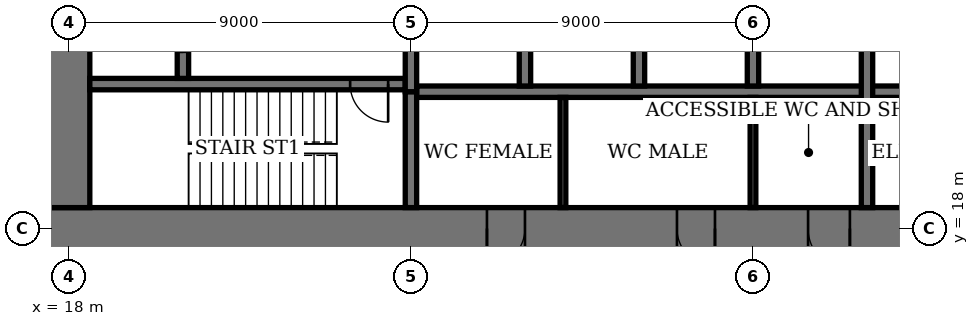
"""IFC4 building model, lengths in metres.
Left out: names, types, materials, properties, quantities, classifications, styles, units other than length and angle.
Written with IfcOpenShell. Run it as: python <this file> out.ifc"""

import sys

from ifc_helpers import new_model, si_unit, direction, frame, frame_2d, origin, place, context, subcontext, project, spatial, rectangle, extrude, element, fill, save


model = new_model("IFC4")
c1 = context("Model", 3, precision=1e-05, world=origin(), true_north=direction((0.0, 1.0)))
c2 = subcontext(c1, "Body", "Model", "MODEL_VIEW")
j1 = project(units=[si_unit("LENGTHUNIT", "METRE"), si_unit("PLANEANGLEUNIT", "RADIAN")], contexts=[c1])
p1 = place(None, origin())
s1 = spatial("IfcSite", under=j1, at=p1, CompositionType="ELEMENT")
p2 = place(p1, origin())
s2 = spatial("IfcBuilding", under=s1, at=p2, CompositionType="ELEMENT")
p3 = place(p2, frame((0.0, 0.0, 263.4)))
s3 = spatial("IfcBuildingStorey", under=s2, at=p3, CompositionType="ELEMENT", Elevation=263.4)
p4 = place(p3, frame((17.45, 18.0, 0.0), z_axis=(0.0, 0.0, 1.0), x_axis=(1.0, 0.0, 0.0)))
e1 = element("IfcWall", 1, at=p4, inside=s3, PredefinedType="SHEAR", context=c2, shape_type="SweptSolid", body=[
    extrude(rectangle(XDim=28.1, YDim=1.1, at=frame_2d((14.05, 0.0))), origin(), (0.0, 0.0, 1.0), 4.0),
])
p5 = place(p4, frame((11.55, 0.0, 0.0)))
e2 = element("IfcOpeningElement", 2, at=p5, cuts=e1, PredefinedType="OPENING", context=c2, shape_type="SweptSolid", body=[
    extrude(rectangle(XDim=1.0, YDim=2.4, at=frame_2d((0.5, 1.2))), frame((0.0, 0.56, 0.0), z_axis=(0.0, -1.0, 0.0), x_axis=(1.0, 0.0, 0.0)), (0.0, 0.0, 1.0), 1.12),
])
p6 = place(p4, frame((16.55, 0.0, 0.0)))
e3 = element("IfcOpeningElement", 3, at=p6, cuts=e1, PredefinedType="OPENING", context=c2, shape_type="SweptSolid", body=[
    extrude(rectangle(XDim=1.0, YDim=2.4, at=frame_2d((0.5, 1.2))), frame((0.0, 0.56, 0.0), z_axis=(0.0, -1.0, 0.0), x_axis=(1.0, 0.0, 0.0)), (0.0, 0.0, 1.0), 1.12),
])
p7 = place(p4, frame((20.0, 0.0, 0.0)))
e4 = element("IfcOpeningElement", 4, at=p7, cuts=e1, PredefinedType="OPENING", context=c2, shape_type="SweptSolid", body=[
    extrude(rectangle(XDim=1.1, YDim=2.4, at=frame_2d((0.55, 1.2))), frame((0.0, 0.56, 0.0), z_axis=(0.0, -1.0, 0.0), x_axis=(1.0, 0.0, 0.0)), (0.0, 0.0, 1.0), 1.12),
])
p8 = place(p4, frame((24.05, 0.0, 0.0)))
e5 = element("IfcOpeningElement", 5, at=p8, cuts=e1, PredefinedType="OPENING", context=c2, shape_type="SweptSolid", body=[
    extrude(rectangle(XDim=1.0, YDim=2.4, at=frame_2d((0.5, 1.2))), frame((0.0, 0.56, 0.0), z_axis=(0.0, -1.0, 0.0), x_axis=(1.0, 0.0, 0.0)), (0.0, 0.0, 1.0), 1.12),
])
p9 = place(p3, frame((18.0, 35.45, 0.0), z_axis=(0.0, 0.0, 1.0), x_axis=(0.0, -1.0, 0.0)))
e6 = element("IfcWall", 6, at=p9, inside=s3, PredefinedType="SHEAR", context=c2, shape_type="SweptSolid", body=[
    extrude(rectangle(XDim=16.9, YDim=1.1, at=frame_2d((8.45, 0.0))), origin(), (0.0, 0.0, 1.0), 4.0),
])
p10 = place(p9, frame((8.45, 0.0, 0.0)))
e7 = element("IfcOpeningElement", 7, at=p10, cuts=e6, PredefinedType="OPENING", context=c2, shape_type="SweptSolid", body=[
    extrude(rectangle(XDim=1.8, YDim=2.4, at=frame_2d((0.9, 1.2))), frame((0.0, 0.56, 0.0), z_axis=(0.0, -1.0, 0.0), x_axis=(1.0, 0.0, 0.0)), (0.0, 0.0, 1.0), 1.12),
])
p11 = place(p3, frame((18.55, 21.8, 0.0), z_axis=(0.0, 0.0, 1.0), x_axis=(1.0, 0.0, 0.0)))
e8 = element("IfcWall", 8, at=p11, inside=s3, PredefinedType="SHEAR", context=c2, shape_type="SweptSolid", body=[
    extrude(rectangle(XDim=8.3, YDim=0.3, at=frame_2d((4.15, 0.0))), origin(), (0.0, 0.0, 1.0), 4.0),
])
p12 = place(p11, frame((6.85, 0.0, 0.0)))
e9 = element("IfcOpeningElement", 9, at=p12, cuts=e8, PredefinedType="OPENING", context=c2, shape_type="SweptSolid", body=[
    extrude(rectangle(XDim=1.0, YDim=2.4, at=frame_2d((0.5, 1.2))), frame((0.0, 0.16, 0.0), z_axis=(0.0, -1.0, 0.0), x_axis=(1.0, 0.0, 0.0)), (0.0, 0.0, 1.0), 0.32),
])
p13 = place(p3, frame((27.0, 18.55, 0.0), z_axis=(0.0, 0.0, 1.0), x_axis=(0.0, 1.0, 0.0)))
e10 = element("IfcWall", 10, at=p13, inside=s3, PredefinedType="SHEAR", context=c2, shape_type="SweptSolid", body=[
    extrude(rectangle(XDim=3.05, YDim=0.3, at=frame_2d((1.525, 0.0))), origin(), (0.0, 0.0, 1.0), 4.0),
])
p14 = place(p3, frame((21.0, 21.95, 0.0), z_axis=(0.0, 0.0, 1.0), x_axis=(0.0, 1.0, 0.0)))
e11 = element("IfcWall", 11, at=p14, inside=s3, PredefinedType="SHEAR", context=c2, shape_type="SweptSolid", body=[
    extrude(rectangle(XDim=2.5, YDim=0.3, at=frame_2d((1.25, 0.0))), origin(), (0.0, 0.0, 1.0), 4.0),
])
p15 = place(p14, frame((0.7, 0.0, 0.0)))
e12 = element("IfcOpeningElement", 12, at=p15, cuts=e11, PredefinedType="OPENING", context=c2, shape_type="SweptSolid", body=[
    extrude(rectangle(XDim=1.1, YDim=2.4, at=frame_2d((0.55, 1.2))), frame((0.0, 0.16, 0.0), z_axis=(0.0, -1.0, 0.0), x_axis=(1.0, 0.0, 0.0)), (0.0, 0.0, 1.0), 0.32),
])
p16 = place(p3, frame((27.15, 21.6, 0.0), z_axis=(0.0, 0.0, 1.0), x_axis=(1.0, 0.0, 0.0)))
e13 = element("IfcWall", 13, at=p16, inside=s3, PredefinedType="SHEAR", context=c2, shape_type="SweptSolid", body=[
    extrude(rectangle(XDim=17.3, YDim=0.3, at=frame_2d((8.65, 0.0))), origin(), (0.0, 0.0, 1.0), 4.0),
])
for number, where, z_axis, x_axis in (
    (14, (30.0, 21.75, 0.0), (0.0, 0.0, 1.0), (0.0, 1.0, 0.0)),
    (15, (33.0, 21.75, 0.0), (0.0, 0.0, 1.0), (0.0, 1.0, 0.0)),
    (16, (36.0, 21.75, 0.0), (0.0, 0.0, 1.0), (0.0, 1.0, 0.0)),
):
    element("IfcWall", number, at=place(p3, frame(where, z_axis=z_axis, x_axis=x_axis)), inside=s3, PredefinedType="SHEAR", context=c2, shape_type="SweptSolid", body=[
        extrude(rectangle(XDim=2.7, YDim=0.3, at=frame_2d((1.35, 0.0))), origin(), (0.0, 0.0, 1.0), 4.0),
    ])
p17 = place(p3, frame((39.0, 18.55, 0.0), z_axis=(0.0, 0.0, 1.0), x_axis=(0.0, 1.0, 0.0)))
e17 = element("IfcWall", 17, at=p17, inside=s3, PredefinedType="SHEAR", context=c2, shape_type="SweptSolid", body=[
    extrude(rectangle(XDim=5.9, YDim=0.3, at=frame_2d((2.95, 0.0))), origin(), (0.0, 0.0, 1.0), 4.0),
])
p18 = place(p3, frame((27.0, 21.6, 0.0), z_axis=(0.0, 0.0, 1.0), x_axis=(0.0, 1.0, 0.0)))
e18 = element("IfcWall", 18, at=p18, inside=s3, PredefinedType="SHEAR", context=c2, shape_type="SweptSolid", body=[
    extrude(rectangle(XDim=2.85, YDim=0.3, at=frame_2d((1.425, 0.0))), origin(), (0.0, 0.0, 1.0), 4.0),
])
for number, where, z_axis, x_axis in (
    (19, (31.0, 18.55, 0.0), (0.0, 0.0, 1.0), (0.0, 1.0, 0.0)),
    (20, (36.0, 18.55, 0.0), (0.0, 0.0, 1.0), (0.0, 1.0, 0.0)),
):
    element("IfcWall", number, at=place(p3, frame(where, z_axis=z_axis, x_axis=x_axis)), inside=s3, PredefinedType="PARTITIONING", context=c2, shape_type="SweptSolid", body=[
        extrude(rectangle(XDim=2.9, YDim=0.15, at=frame_2d((1.45, 0.0))), origin(), (0.0, 0.0, 1.0), 3.75),
    ])
p19 = place(p5, origin())
e21 = element("IfcDoor", 21, at=p19, inside=s3, OperationType="SINGLE_SWING_LEFT", PredefinedType="DOOR", context=c2, shape_type="SweptSolid", body=[
    extrude(rectangle(XDim=1.0, YDim=2.4, at=frame_2d((0.5, 1.2))), frame((0.0, 0.025, 0.0), z_axis=(0.0, -1.0, 0.0), x_axis=(1.0, 0.0, 0.0)), (0.0, 0.0, 1.0), 0.05),
    extrude(rectangle(XDim=0.04, YDim=2.4, at=frame_2d((0.02, 1.2))), frame((0.0, 0.4, 0.0), z_axis=(0.0, -1.0, 0.0), x_axis=(1.0, 0.0, 0.0)), (0.0, 0.0, 1.0), 0.8),
    extrude(rectangle(XDim=0.04, YDim=2.4, at=frame_2d((0.98, 1.2))), frame((0.0, 0.4, 0.0), z_axis=(0.0, -1.0, 0.0), x_axis=(1.0, 0.0, 0.0)), (0.0, 0.0, 1.0), 0.8),
    extrude(rectangle(XDim=1.0, YDim=0.04, at=frame_2d((0.5, 2.38))), frame((0.0, 0.4, 0.0), z_axis=(0.0, -1.0, 0.0), x_axis=(1.0, 0.0, 0.0)), (0.0, 0.0, 1.0), 0.8),
])
fill(e2, e21)
p20 = place(p6, origin())
e22 = element("IfcDoor", 22, at=p20, inside=s3, OperationType="SINGLE_SWING_RIGHT", PredefinedType="DOOR", context=c2, shape_type="SweptSolid", body=[
    extrude(rectangle(XDim=1.0, YDim=2.4, at=frame_2d((0.5, 1.2))), frame((0.0, 0.025, 0.0), z_axis=(0.0, -1.0, 0.0), x_axis=(1.0, 0.0, 0.0)), (0.0, 0.0, 1.0), 0.05),
    extrude(rectangle(XDim=0.04, YDim=2.4, at=frame_2d((0.02, 1.2))), frame((0.0, 0.4, 0.0), z_axis=(0.0, -1.0, 0.0), x_axis=(1.0, 0.0, 0.0)), (0.0, 0.0, 1.0), 0.8),
    extrude(rectangle(XDim=0.04, YDim=2.4, at=frame_2d((0.98, 1.2))), frame((0.0, 0.4, 0.0), z_axis=(0.0, -1.0, 0.0), x_axis=(1.0, 0.0, 0.0)), (0.0, 0.0, 1.0), 0.8),
    extrude(rectangle(XDim=1.0, YDim=0.04, at=frame_2d((0.5, 2.38))), frame((0.0, 0.4, 0.0), z_axis=(0.0, -1.0, 0.0), x_axis=(1.0, 0.0, 0.0)), (0.0, 0.0, 1.0), 0.8),
])
fill(e3, e22)
p21 = place(p7, origin())
e23 = element("IfcDoor", 23, at=p21, inside=s3, OperationType="SINGLE_SWING_RIGHT", PredefinedType="DOOR", context=c2, shape_type="SweptSolid", body=[
    extrude(rectangle(XDim=1.1, YDim=2.4, at=frame_2d((0.55, 1.2))), frame((0.0, 0.025, 0.0), z_axis=(0.0, -1.0, 0.0), x_axis=(1.0, 0.0, 0.0)), (0.0, 0.0, 1.0), 0.05),
    extrude(rectangle(XDim=0.04, YDim=2.4, at=frame_2d((0.02, 1.2))), frame((0.0, 0.44, 0.0), z_axis=(0.0, -1.0, 0.0), x_axis=(1.0, 0.0, 0.0)), (0.0, 0.0, 1.0), 0.88),
    extrude(rectangle(XDim=0.04, YDim=2.4, at=frame_2d((1.08, 1.2))), frame((0.0, 0.44, 0.0), z_axis=(0.0, -1.0, 0.0), x_axis=(1.0, 0.0, 0.0)), (0.0, 0.0, 1.0), 0.88),
    extrude(rectangle(XDim=1.1, YDim=0.04, at=frame_2d((0.55, 2.38))), frame((0.0, 0.44, 0.0), z_axis=(0.0, -1.0, 0.0), x_axis=(1.0, 0.0, 0.0)), (0.0, 0.0, 1.0), 0.88),
])
fill(e4, e23)
p22 = place(p12, origin())
e24 = element("IfcDoor", 24, at=p22, inside=s3, OperationType="SINGLE_SWING_RIGHT", PredefinedType="DOOR", context=c2, shape_type="SweptSolid", body=[
    extrude(rectangle(XDim=1.0, YDim=2.4, at=frame_2d((0.5, 1.2))), frame((0.0, 0.03, 0.0), z_axis=(0.0, -1.0, 0.0), x_axis=(1.0, 0.0, 0.0)), (0.0, 0.0, 1.0), 0.06),
])
fill(e9, e24)
save(model, sys.argv[1])
